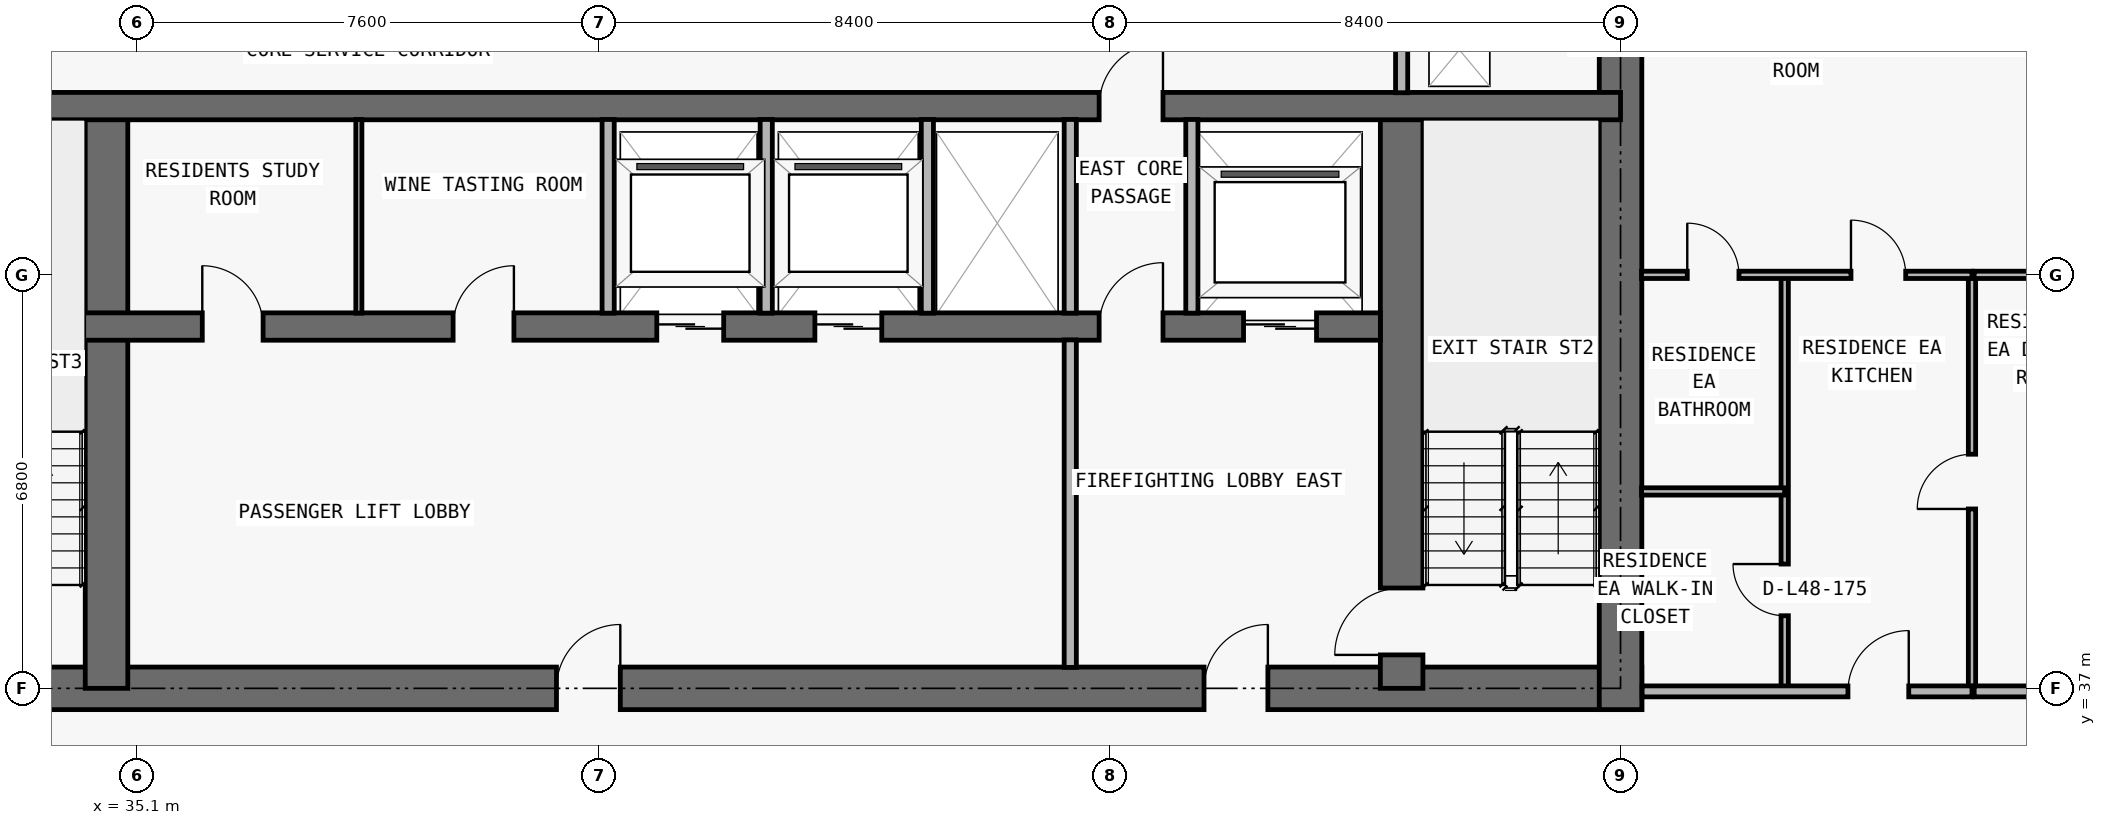
"""IFC4 building model, lengths in metres.
Left out: names, types, materials, properties, quantities, classifications, styles, units other than length and angle.
Written with IfcOpenShell. Run it as: python <this file> out.ifc"""

import sys

from ifc_helpers import new_model, si_unit, direction, frame, frame_2d, origin, place, context, subcontext, project, spatial, rectangle, extrude, element, fill, save


model = new_model("IFC4")
c1 = context("Model", 3, precision=1e-05, world=origin(), true_north=direction((0.0, 1.0)))
c2 = subcontext(c1, "Body", "Model", "MODEL_VIEW")
j1 = project(units=[si_unit("LENGTHUNIT", "METRE"), si_unit("PLANEANGLEUNIT", "RADIAN")], contexts=[c1])
p1 = place(None, origin())
s1 = spatial("IfcSite", under=j1, at=p1, CompositionType="ELEMENT")
p2 = place(p1, origin())
s2 = spatial("IfcBuilding", under=s1, at=p2, CompositionType="ELEMENT")
p3 = place(p2, frame((0.0, 0.0, 173.7)))
s3 = spatial("IfcBuildingStorey", under=s2, at=p3, CompositionType="ELEMENT", Elevation=173.7)
p4 = place(p3, frame((17.95, 37.0, 0.0), z_axis=(0.0, 0.0, 1.0), x_axis=(1.0, 0.0, 0.0)))
e1 = element("IfcWall", 1, at=p4, inside=s3, PredefinedType="SHEAR", context=c2, shape_type="SweptSolid", body=[
    extrude(rectangle(XDim=41.9, YDim=0.7, at=frame_2d((20.95, 0.0))), origin(), (0.0, 0.0, 1.0), 3.05),
])
p5 = place(p4, frame((14.35, 0.0, 0.0)))
e2 = element("IfcOpeningElement", 2, at=p5, cuts=e1, PredefinedType="OPENING", context=c2, shape_type="SweptSolid", body=[
    extrude(rectangle(XDim=1.1, YDim=2.15, at=frame_2d((0.55, 1.075))), frame((0.0, 0.36, 0.0), z_axis=(0.0, -1.0, 0.0), x_axis=(1.0, 0.0, 0.0)), (0.0, 0.0, 1.0), 0.72),
])
p6 = place(p4, frame((6.2, 0.0, 0.0)))
e3 = element("IfcOpeningElement", 3, at=p6, cuts=e1, PredefinedType="OPENING", context=c2, shape_type="SweptSolid", body=[
    extrude(rectangle(XDim=1.05, YDim=2.15, at=frame_2d((0.525, 1.075))), frame((0.0, 0.36, 0.0), z_axis=(0.0, -1.0, 0.0), x_axis=(1.0, 0.0, 0.0)), (0.0, 0.0, 1.0), 0.72),
])
p7 = place(p4, frame((34.7, 0.0, 0.0)))
e4 = element("IfcOpeningElement", 4, at=p7, cuts=e1, PredefinedType="OPENING", context=c2, shape_type="SweptSolid", body=[
    extrude(rectangle(XDim=1.05, YDim=2.15, at=frame_2d((0.525, 1.075))), frame((0.0, 0.36, 0.0), z_axis=(0.0, -1.0, 0.0), x_axis=(1.0, 0.0, 0.0)), (0.0, 0.0, 1.0), 0.72),
])
p8 = place(p4, frame((10.812, 0.0, 0.0)))
e5 = element("IfcOpeningElement", 5, at=p8, cuts=e1, PredefinedType="OPENING", context=c2, shape_type="SweptSolid", body=[
    extrude(rectangle(XDim=1.05, YDim=2.15, at=frame_2d((0.525, 1.075))), frame((0.0, 0.36, 0.0), z_axis=(0.0, -1.0, 0.0), x_axis=(1.0, 0.0, 0.0)), (0.0, 0.0, 1.0), 0.72),
])
p9 = place(p4, frame((24.05, 0.0, 0.0)))
e6 = element("IfcOpeningElement", 6, at=p9, cuts=e1, PredefinedType="OPENING", context=c2, shape_type="SweptSolid", body=[
    extrude(rectangle(XDim=1.05, YDim=2.15, at=frame_2d((0.525, 1.075))), frame((0.0, 0.36, 0.0), z_axis=(0.0, -1.0, 0.0), x_axis=(1.0, 0.0, 0.0)), (0.0, 0.0, 1.0), 0.72),
])
p10 = place(p3, frame((59.5, 36.65, 0.0), z_axis=(0.0, 0.0, 1.0), x_axis=(0.0, 1.0, 0.0)))
e7 = element("IfcWall", 7, at=p10, inside=s3, PredefinedType="SHEAR", context=c2, shape_type="SweptSolid", body=[
    extrude(rectangle(XDim=13.95, YDim=0.7, at=frame_2d((6.975, 0.0))), origin(), (0.0, 0.0, 1.0), 3.05),
])
p11 = place(p3, frame((55.9, 37.0, 0.0), z_axis=(0.0, 0.0, 1.0), x_axis=(0.0, 1.0, 0.0)))
e8 = element("IfcWall", 8, at=p11, inside=s3, PredefinedType="SHEAR", context=c2, shape_type="SweptSolid", body=[
    extrude(rectangle(XDim=9.575, YDim=0.7, at=frame_2d((4.788, 0.0))), origin(), (0.0, 0.0, 1.0), 3.05),
])
p12 = place(p11, frame((0.55, 0.0, 0.0)))
e9 = element("IfcOpeningElement", 9, at=p12, cuts=e8, PredefinedType="OPENING", context=c2, shape_type="SweptSolid", body=[
    extrude(rectangle(XDim=1.1, YDim=2.15, at=frame_2d((0.55, 1.075))), frame((0.0, 0.36, 0.0), z_axis=(0.0, -1.0, 0.0), x_axis=(1.0, 0.0, 0.0)), (0.0, 0.0, 1.0), 0.72),
])
p13 = place(p3, frame((34.6, 37.0, 0.0), z_axis=(0.0, 0.0, 1.0), x_axis=(0.0, 1.0, 0.0)))
e10 = element("IfcWall", 10, at=p13, inside=s3, PredefinedType="SHEAR", context=c2, shape_type="SweptSolid", body=[
    extrude(rectangle(XDim=9.575, YDim=0.7, at=frame_2d((4.788, 0.0))), origin(), (0.0, 0.0, 1.0), 3.05),
])
p14 = place(p3, frame((22.25, 42.95, 0.0), z_axis=(0.0, 0.0, 1.0), x_axis=(1.0, 0.0, 0.0)))
e11 = element("IfcWall", 11, at=p14, inside=s3, PredefinedType="SHEAR", context=c2, shape_type="SweptSolid", body=[
    extrude(rectangle(XDim=33.3, YDim=0.45, at=frame_2d((16.65, 0.0))), origin(), (0.0, 0.0, 1.0), 3.05),
])
p15 = place(p14, frame((1.05, 0.0, 0.0)))
e12 = element("IfcOpeningElement", 12, at=p15, cuts=e11, PredefinedType="OPENING", context=c2, shape_type="SweptSolid", body=[
    extrude(rectangle(XDim=1.2, YDim=2.2, at=frame_2d((0.6, 1.1))), frame((0.0, 0.235, 0.0), z_axis=(0.0, -1.0, 0.0), x_axis=(1.0, 0.0, 0.0)), (0.0, 0.0, 1.0), 0.47),
])
p16 = place(p14, frame((31.05, 0.0, 0.0)))
e13 = element("IfcOpeningElement", 13, at=p16, cuts=e11, PredefinedType="OPENING", context=c2, shape_type="SweptSolid", body=[
    extrude(rectangle(XDim=1.2, YDim=2.2, at=frame_2d((0.6, 1.1))), frame((0.0, 0.235, 0.0), z_axis=(0.0, -1.0, 0.0), x_axis=(1.0, 0.0, 0.0)), (0.0, 0.0, 1.0), 0.47),
])
p17 = place(p14, frame((21.4, 0.0, 0.0)))
e14 = element("IfcOpeningElement", 14, at=p17, cuts=e11, PredefinedType="OPENING", context=c2, shape_type="SweptSolid", body=[
    extrude(rectangle(XDim=1.1, YDim=2.2, at=frame_2d((0.55, 1.1))), frame((0.0, 0.235, 0.0), z_axis=(0.0, -1.0, 0.0), x_axis=(1.0, 0.0, 0.0)), (0.0, 0.0, 1.0), 0.47),
])
p18 = place(p14, frame((24.0, 0.0, 0.0)))
e15 = element("IfcOpeningElement", 15, at=p18, cuts=e11, PredefinedType="OPENING", context=c2, shape_type="SweptSolid", body=[
    extrude(rectangle(XDim=1.1, YDim=2.2, at=frame_2d((0.55, 1.1))), frame((0.0, 0.235, 0.0), z_axis=(0.0, -1.0, 0.0), x_axis=(1.0, 0.0, 0.0)), (0.0, 0.0, 1.0), 0.47),
])
p19 = place(p14, frame((3.625, 0.0, 0.0)))
e16 = element("IfcOpeningElement", 16, at=p19, cuts=e11, PredefinedType="OPENING", context=c2, shape_type="SweptSolid", body=[
    extrude(rectangle(XDim=1.05, YDim=2.15, at=frame_2d((0.525, 1.075))), frame((0.0, 0.235, 0.0), z_axis=(0.0, -1.0, 0.0), x_axis=(1.0, 0.0, 0.0)), (0.0, 0.0, 1.0), 0.47),
])
p20 = place(p14, frame((28.675, 0.0, 0.0)))
e17 = element("IfcOpeningElement", 17, at=p20, cuts=e11, PredefinedType="OPENING", context=c2, shape_type="SweptSolid", body=[
    extrude(rectangle(XDim=1.05, YDim=2.15, at=frame_2d((0.525, 1.075))), frame((0.0, 0.235, 0.0), z_axis=(0.0, -1.0, 0.0), x_axis=(1.0, 0.0, 0.0)), (0.0, 0.0, 1.0), 0.47),
])
p21 = place(p14, frame((13.925, 0.0, 0.0)))
e18 = element("IfcOpeningElement", 18, at=p21, cuts=e11, PredefinedType="OPENING", context=c2, shape_type="SweptSolid", body=[
    extrude(rectangle(XDim=1.0, YDim=2.2, at=frame_2d((0.5, 1.1))), frame((0.0, 0.235, 0.0), z_axis=(0.0, -1.0, 0.0), x_axis=(1.0, 0.0, 0.0)), (0.0, 0.0, 1.0), 0.47),
])
p22 = place(p14, frame((18.05, 0.0, 0.0)))
e19 = element("IfcOpeningElement", 19, at=p22, cuts=e11, PredefinedType="OPENING", context=c2, shape_type="SweptSolid", body=[
    extrude(rectangle(XDim=1.0, YDim=2.2, at=frame_2d((0.5, 1.1))), frame((0.0, 0.235, 0.0), z_axis=(0.0, -1.0, 0.0), x_axis=(1.0, 0.0, 0.0)), (0.0, 0.0, 1.0), 0.47),
])
p23 = place(p3, frame((18.3, 46.575, 0.0), z_axis=(0.0, 0.0, 1.0), x_axis=(1.0, 0.0, 0.0)))
e20 = element("IfcWall", 20, at=p23, inside=s3, PredefinedType="SHEAR", context=c2, shape_type="SweptSolid", body=[
    extrude(rectangle(XDim=41.2, YDim=0.45, at=frame_2d((20.6, 0.0))), origin(), (0.0, 0.0, 1.0), 3.05),
])
p24 = place(p23, frame((7.575, 0.0, 0.0)))
e21 = element("IfcOpeningElement", 21, at=p24, cuts=e20, PredefinedType="OPENING", context=c2, shape_type="SweptSolid", body=[
    extrude(rectangle(XDim=1.05, YDim=2.15, at=frame_2d((0.525, 1.075))), frame((0.0, 0.235, 0.0), z_axis=(0.0, -1.0, 0.0), x_axis=(1.0, 0.0, 0.0)), (0.0, 0.0, 1.0), 0.47),
])
p25 = place(p23, frame((32.625, 0.0, 0.0)))
e22 = element("IfcOpeningElement", 22, at=p25, cuts=e20, PredefinedType="OPENING", context=c2, shape_type="SweptSolid", body=[
    extrude(rectangle(XDim=1.05, YDim=2.15, at=frame_2d((0.525, 1.075))), frame((0.0, 0.235, 0.0), z_axis=(0.0, -1.0, 0.0), x_axis=(1.0, 0.0, 0.0)), (0.0, 0.0, 1.0), 0.47),
])
p26 = place(p3, frame((38.75, 43.17, 0.0), z_axis=(0.0, 0.0, 1.0), x_axis=(0.0, 1.0, 0.0)))
e23 = element("IfcWall", 23, at=p26, inside=s3, PredefinedType="MOVABLE", context=c2, shape_type="SweptSolid", body=[
    extrude(rectangle(XDim=3.185, YDim=0.1, at=frame_2d((1.593, 0.0))), origin(), (0.0, 0.0, 1.0), 3.05),
])
for number, where, z_axis, x_axis in (
    (24, (42.85, 43.17, 0.0), (0.0, 0.0, 1.0), (0.0, 1.0, 0.0)),
    (25, (45.45, 43.17, 0.0), (0.0, 0.0, 1.0), (0.0, 1.0, 0.0)),
    (26, (48.1, 43.17, 0.0), (0.0, 0.0, 1.0), (0.0, 1.0, 0.0)),
):
    element("IfcWall", number, at=place(p3, frame(where, z_axis=z_axis, x_axis=x_axis)), inside=s3, PredefinedType="PARTITIONING", context=c2, shape_type="SweptSolid", body=[
        extrude(rectangle(XDim=3.185, YDim=0.2, at=frame_2d((1.593, 0.0))), origin(), (0.0, 0.0, 1.0), 3.05),
    ])
p27 = place(p3, frame((50.45, 37.345, 0.0), z_axis=(0.0, 0.0, 1.0), x_axis=(0.0, 1.0, 0.0)))
e27 = element("IfcWall", 27, at=p27, inside=s3, PredefinedType="PARTITIONING", context=c2, shape_type="SweptSolid", body=[
    extrude(rectangle(XDim=5.385, YDim=0.2, at=frame_2d((2.692, 0.0))), origin(), (0.0, 0.0, 1.0), 3.05),
])
for number, where, z_axis, x_axis in (
    (28, (50.45, 43.17, 0.0), (0.0, 0.0, 1.0), (0.0, 1.0, 0.0)),
    (29, (52.45, 43.17, 0.0), (0.0, 0.0, 1.0), (0.0, 1.0, 0.0)),
):
    element("IfcWall", number, at=place(p3, frame(where, z_axis=z_axis, x_axis=x_axis)), inside=s3, PredefinedType="PARTITIONING", context=c2, shape_type="SweptSolid", body=[
        extrude(rectangle(XDim=3.185, YDim=0.2, at=frame_2d((1.593, 0.0))), origin(), (0.0, 0.0, 1.0), 3.05),
    ])
p28 = place(p3, frame((55.9, 46.795, 0.0), z_axis=(0.0, 0.0, 1.0), x_axis=(0.0, 1.0, 0.0)))
e30 = element("IfcWall", 30, at=p28, inside=s3, PredefinedType="PARTITIONING", context=c2, shape_type="SweptSolid", body=[
    extrude(rectangle(XDim=3.16, YDim=0.2, at=frame_2d((1.58, 0.0))), origin(), (0.0, 0.0, 1.0), 3.05),
])
p29 = place(p3, frame((62.2, 37.0, 0.0), z_axis=(0.0, 0.0, 1.0), x_axis=(0.0, 1.0, 0.0)))
e31 = element("IfcWall", 31, at=p29, inside=s3, PredefinedType="PARTITIONING", context=c2, shape_type="SweptSolid", body=[
    extrude(rectangle(XDim=6.8, YDim=0.12, at=frame_2d((3.4, 0.0))), origin(), (0.0, 0.0, 1.0), 2.578),
])
p30 = place(p29, frame((1.194, 0.0, 0.0)))
e32 = element("IfcOpeningElement", 32, at=p30, cuts=e31, PredefinedType="OPENING", context=c2, shape_type="SweptSolid", body=[
    extrude(rectangle(XDim=0.85, YDim=2.1, at=frame_2d((0.425, 1.05))), frame((0.0, 0.07, 0.0), z_axis=(0.0, -1.0, 0.0), x_axis=(1.0, 0.0, 0.0)), (0.0, 0.0, 1.0), 0.14),
])
p31 = place(p3, frame((65.28, 37.0, 0.0), z_axis=(0.0, 0.0, 1.0), x_axis=(0.0, 1.0, 0.0)))
e33 = element("IfcWall", 33, at=p31, inside=s3, PredefinedType="PARTITIONING", context=c2, shape_type="SweptSolid", body=[
    extrude(rectangle(XDim=6.8, YDim=0.12, at=frame_2d((3.4, 0.0))), origin(), (0.0, 0.0, 1.0), 2.679),
])
p32 = place(p31, frame((2.95, 0.0, 0.0)))
e34 = element("IfcOpeningElement", 34, at=p32, cuts=e33, PredefinedType="OPENING", context=c2, shape_type="SweptSolid", body=[
    extrude(rectangle(XDim=0.9, YDim=2.15, at=frame_2d((0.45, 1.075))), frame((0.0, 0.07, 0.0), z_axis=(0.0, -1.0, 0.0), x_axis=(1.0, 0.0, 0.0)), (0.0, 0.0, 1.0), 0.14),
])
p33 = place(p3, frame((59.855, 36.95, 0.0), z_axis=(0.0, 0.0, 1.0), x_axis=(1.0, 0.0, 0.0)))
e35 = element("IfcWall", 35, at=p33, inside=s3, PredefinedType="PARTITIONING", context=c2, shape_type="SweptSolid", body=[
    extrude(rectangle(XDim=5.425, YDim=0.18, at=frame_2d((2.712, 0.0))), origin(), (0.0, 0.0, 1.0), 3.05),
])
p34 = place(p33, frame((3.385, 0.0, 0.0)))
e36 = element("IfcOpeningElement", 36, at=p34, cuts=e35, PredefinedType="OPENING", context=c2, shape_type="SweptSolid", body=[
    extrude(rectangle(XDim=1.0, YDim=2.2, at=frame_2d((0.5, 1.1))), frame((0.0, 0.1, 0.0), z_axis=(0.0, -1.0, 0.0), x_axis=(1.0, 0.0, 0.0)), (0.0, 0.0, 1.0), 0.2),
])
p35 = place(p3, frame((65.316, 36.95, 0.0), z_axis=(0.0, 0.0, 1.0), x_axis=(1.0, 0.0, 0.0)))
e37 = element("IfcWall", 37, at=p35, inside=s3, PredefinedType="PARTITIONING", context=c2, shape_type="SweptSolid", body=[
    extrude(rectangle(XDim=2.384, YDim=0.18, at=frame_2d((1.192, 0.0))), origin(), (0.0, 0.0, 1.0), 3.05),
])
p36 = place(p3, frame((59.845, 40.238, 0.0), z_axis=(0.0, 0.0, 1.0), x_axis=(1.0, 0.0, 0.0)))
e38 = element("IfcWall", 38, at=p36, inside=s3, PredefinedType="PARTITIONING", context=c2, shape_type="SweptSolid", body=[
    extrude(rectangle(XDim=2.355, YDim=0.12, at=frame_2d((1.177, 0.0))), origin(), (0.0, 0.0, 1.0), 3.05),
])
p37 = place(p3, frame((59.845, 43.8, 0.0), z_axis=(0.0, 0.0, 1.0), x_axis=(1.0, 0.0, 0.0)))
e39 = element("IfcWall", 39, at=p37, inside=s3, PredefinedType="PARTITIONING", context=c2, shape_type="SweptSolid", body=[
    extrude(rectangle(XDim=5.435, YDim=0.12, at=frame_2d((2.718, 0.0))), origin(), (0.0, 0.0, 1.0), 2.418),
])
p38 = place(p37, frame((3.445, 0.0, 0.0)))
e40 = element("IfcOpeningElement", 40, at=p38, cuts=e39, PredefinedType="OPENING", context=c2, shape_type="SweptSolid", body=[
    extrude(rectangle(XDim=0.9, YDim=2.15, at=frame_2d((0.45, 1.075))), frame((0.0, 0.07, 0.0), z_axis=(0.0, -1.0, 0.0), x_axis=(1.0, 0.0, 0.0)), (0.0, 0.0, 1.0), 0.14),
])
p39 = place(p37, frame((0.752, 0.0, 0.0)))
e41 = element("IfcOpeningElement", 41, at=p39, cuts=e39, PredefinedType="OPENING", context=c2, shape_type="SweptSolid", body=[
    extrude(rectangle(XDim=0.85, YDim=2.1, at=frame_2d((0.425, 1.05))), frame((0.0, 0.07, 0.0), z_axis=(0.0, -1.0, 0.0), x_axis=(1.0, 0.0, 0.0)), (0.0, 0.0, 1.0), 0.14),
])
p40 = place(p3, frame((65.316, 43.8, 0.0), z_axis=(0.0, 0.0, 1.0), x_axis=(1.0, 0.0, 0.0)))
e42 = element("IfcWall", 42, at=p40, inside=s3, PredefinedType="PARTITIONING", context=c2, shape_type="SweptSolid", body=[
    extrude(rectangle(XDim=6.089, YDim=0.12, at=frame_2d((3.044, 0.0))), origin(), (0.0, 0.0, 1.0), 2.418),
])
p41 = place(p16, origin())
e43 = element("IfcDoor", 43, at=p41, inside=s3, OperationType="DOUBLE_DOOR_SLIDING", PredefinedType="DOOR", context=c2, shape_type="SweptSolid", body=[
    extrude(rectangle(XDim=1.2, YDim=2.2, at=frame_2d((0.6, 1.1))), frame((0.0, 0.025, 0.0), z_axis=(0.0, -1.0, 0.0), x_axis=(1.0, 0.0, 0.0)), (0.0, 0.0, 1.0), 0.05),
])
fill(e13, e43)
p42 = place(p17, origin())
e44 = element("IfcDoor", 44, at=p42, inside=s3, OperationType="DOUBLE_DOOR_SLIDING", PredefinedType="DOOR", context=c2, shape_type="SweptSolid", body=[
    extrude(rectangle(XDim=1.1, YDim=2.2, at=frame_2d((0.55, 1.1))), frame((0.0, 0.025, 0.0), z_axis=(0.0, -1.0, 0.0), x_axis=(1.0, 0.0, 0.0)), (0.0, 0.0, 1.0), 0.05),
])
fill(e14, e44)
p43 = place(p18, origin())
e45 = element("IfcDoor", 45, at=p43, inside=s3, OperationType="DOUBLE_DOOR_SLIDING", PredefinedType="DOOR", context=c2, shape_type="SweptSolid", body=[
    extrude(rectangle(XDim=1.1, YDim=2.2, at=frame_2d((0.55, 1.1))), frame((0.0, 0.025, 0.0), z_axis=(0.0, -1.0, 0.0), x_axis=(1.0, 0.0, 0.0)), (0.0, 0.0, 1.0), 0.05),
])
fill(e15, e45)
p44 = place(p7, origin())
e46 = element("IfcDoor", 46, at=p44, inside=s3, OperationType="SINGLE_SWING_RIGHT", PredefinedType="DOOR", context=c2, shape_type="SweptSolid", body=[
    extrude(rectangle(XDim=1.05, YDim=2.15, at=frame_2d((0.525, 1.075))), frame((0.0, 0.025, 0.0), z_axis=(0.0, -1.0, 0.0), x_axis=(1.0, 0.0, 0.0)), (0.0, 0.0, 1.0), 0.05),
])
fill(e4, e46)
p45 = place(p12, origin())
e47 = element("IfcDoor", 47, at=p45, inside=s3, OperationType="SINGLE_SWING_LEFT", PredefinedType="DOOR", context=c2, shape_type="SweptSolid", body=[
    extrude(rectangle(XDim=1.1, YDim=2.15, at=frame_2d((0.55, 1.075))), frame((0.0, 0.025, 0.0), z_axis=(0.0, -1.0, 0.0), x_axis=(1.0, 0.0, 0.0)), (0.0, 0.0, 1.0), 0.05),
])
fill(e9, e47)
p46 = place(p20, origin())
e48 = element("IfcDoor", 48, at=p46, inside=s3, OperationType="SINGLE_SWING_RIGHT", PredefinedType="DOOR", context=c2, shape_type="SweptSolid", body=[
    extrude(rectangle(XDim=1.05, YDim=2.15, at=frame_2d((0.525, 1.075))), frame((0.0, 0.025, 0.0), z_axis=(0.0, -1.0, 0.0), x_axis=(1.0, 0.0, 0.0)), (0.0, 0.0, 1.0), 0.05),
])
fill(e17, e48)
p47 = place(p9, origin())
e49 = element("IfcDoor", 49, at=p47, inside=s3, OperationType="SINGLE_SWING_RIGHT", PredefinedType="DOOR", context=c2, shape_type="SweptSolid", body=[
    extrude(rectangle(XDim=1.05, YDim=2.15, at=frame_2d((0.525, 1.075))), frame((0.0, 0.025, 0.0), z_axis=(0.0, -1.0, 0.0), x_axis=(1.0, 0.0, 0.0)), (0.0, 0.0, 1.0), 0.05),
])
fill(e6, e49)
p48 = place(p21, origin())
e50 = element("IfcDoor", 50, at=p48, inside=s3, OperationType="SINGLE_SWING_LEFT", PredefinedType="DOOR", context=c2, shape_type="SweptSolid", body=[
    extrude(rectangle(XDim=1.0, YDim=2.2, at=frame_2d((0.5, 1.1))), frame((0.0, 0.025, 0.0), z_axis=(0.0, -1.0, 0.0), x_axis=(1.0, 0.0, 0.0)), (0.0, 0.0, 1.0), 0.05),
])
fill(e18, e50)
p49 = place(p22, origin())
e51 = element("IfcDoor", 51, at=p49, inside=s3, OperationType="SINGLE_SWING_RIGHT", PredefinedType="DOOR", context=c2, shape_type="SweptSolid", body=[
    extrude(rectangle(XDim=1.0, YDim=2.2, at=frame_2d((0.5, 1.1))), frame((0.0, 0.025, 0.0), z_axis=(0.0, -1.0, 0.0), x_axis=(1.0, 0.0, 0.0)), (0.0, 0.0, 1.0), 0.05),
])
fill(e19, e51)
p50 = place(p25, origin())
e52 = element("IfcDoor", 52, at=p50, inside=s3, OperationType="SINGLE_SWING_RIGHT", PredefinedType="DOOR", context=c2, shape_type="SweptSolid", body=[
    extrude(rectangle(XDim=1.05, YDim=2.15, at=frame_2d((0.525, 1.075))), frame((0.0, 0.025, 0.0), z_axis=(0.0, -1.0, 0.0), x_axis=(1.0, 0.0, 0.0)), (0.0, 0.0, 1.0), 0.05),
])
fill(e22, e52)
p51 = place(p32, origin())
e53 = element("IfcDoor", 53, at=p51, inside=s3, OperationType="SINGLE_SWING_LEFT", PredefinedType="DOOR", context=c2, shape_type="SweptSolid", body=[
    extrude(rectangle(XDim=0.9, YDim=2.15, at=frame_2d((0.45, 1.075))), frame((0.0, 0.025, 0.0), z_axis=(0.0, -1.0, 0.0), x_axis=(1.0, 0.0, 0.0)), (0.0, 0.0, 1.0), 0.05),
])
fill(e34, e53)
p52 = place(p34, origin())
e54 = element("IfcDoor", 54, at=p52, inside=s3, OperationType="SINGLE_SWING_RIGHT", PredefinedType="DOOR", context=c2, shape_type="SweptSolid", body=[
    extrude(rectangle(XDim=1.0, YDim=2.2, at=frame_2d((0.5, 1.1))), frame((0.0, 0.025, 0.0), z_axis=(0.0, -1.0, 0.0), x_axis=(1.0, 0.0, 0.0)), (0.0, 0.0, 1.0), 0.05),
])
fill(e36, e54)
p53 = place(p38, origin())
e55 = element("IfcDoor", 55, at=p53, inside=s3, OperationType="SINGLE_SWING_LEFT", PredefinedType="DOOR", context=c2, shape_type="SweptSolid", body=[
    extrude(rectangle(XDim=0.9, YDim=2.15, at=frame_2d((0.45, 1.075))), frame((0.0, 0.025, 0.0), z_axis=(0.0, -1.0, 0.0), x_axis=(1.0, 0.0, 0.0)), (0.0, 0.0, 1.0), 0.05),
])
fill(e40, e55)
p54 = place(p30, origin())
e56 = element("IfcDoor", 56, at=p54, inside=s3, OperationType="SINGLE_SWING_RIGHT", PredefinedType="DOOR", context=c2, shape_type="SweptSolid", body=[
    extrude(rectangle(XDim=0.85, YDim=2.1, at=frame_2d((0.425, 1.05))), frame((0.0, 0.025, 0.0), z_axis=(0.0, -1.0, 0.0), x_axis=(1.0, 0.0, 0.0)), (0.0, 0.0, 1.0), 0.05),
])
fill(e32, e56)
p55 = place(p39, origin())
e57 = element("IfcDoor", 57, at=p55, inside=s3, OperationType="SINGLE_SWING_LEFT", PredefinedType="DOOR", context=c2, shape_type="SweptSolid", body=[
    extrude(rectangle(XDim=0.85, YDim=2.1, at=frame_2d((0.425, 1.05))), frame((0.0, 0.025, 0.0), z_axis=(0.0, -1.0, 0.0), x_axis=(1.0, 0.0, 0.0)), (0.0, 0.0, 1.0), 0.05),
])
fill(e41, e57)
save(model, sys.argv[1])
